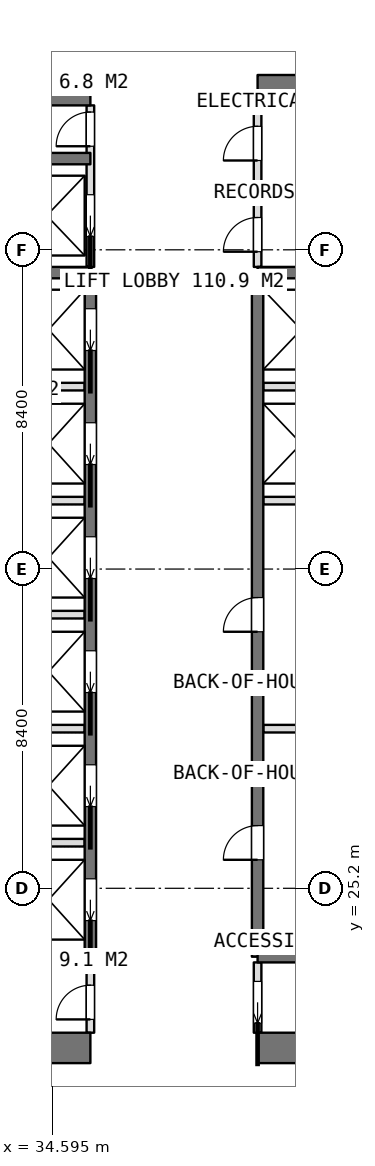
"""IFC4 building model, lengths in metres.
Left out: names, types, materials, properties, quantities, classifications, styles, units other than length and angle.
Written with IfcOpenShell. Run it as: python <this file> out.ifc"""

import sys

from ifc_helpers import new_model, si_unit, direction, frame, frame_2d, origin, place, context, subcontext, project, spatial, rectangle, extrude, element, fill, save


model = new_model("IFC4")
c1 = context("Model", 3, precision=1e-05, world=origin(), true_north=direction((0.0, 1.0)))
c2 = subcontext(c1, "Body", "Model", "MODEL_VIEW")
j1 = project(units=[si_unit("LENGTHUNIT", "METRE"), si_unit("PLANEANGLEUNIT", "RADIAN")], contexts=[c1])
p1 = place(None, origin())
s1 = spatial("IfcSite", under=j1, at=p1, CompositionType="ELEMENT")
p2 = place(p1, origin())
s2 = spatial("IfcBuilding", under=s1, at=p2, CompositionType="ELEMENT")
p3 = place(p2, frame((0.0, 0.0, 257.6)))
s3 = spatial("IfcBuildingStorey", under=s2, at=p3, CompositionType="ELEMENT", Elevation=257.6)
p4 = place(p3, frame((25.2, 21.0, 0.0), z_axis=(0.0, 0.0, 1.0), x_axis=(1.0, 0.0, 0.0)))
e1 = element("IfcWall", 1, at=p4, inside=s3, PredefinedType="SHEAR", context=c2, shape_type="SweptSolid", body=[
    extrude(rectangle(XDim=10.4, YDim=0.8, at=frame_2d((5.2, 0.0))), origin(), (0.0, 0.0, 1.0), 3.75),
])
p5 = place(p3, frame((40.0, 21.0, 0.0), z_axis=(0.0, 0.0, 1.0), x_axis=(1.0, 0.0, 0.0)))
e2 = element("IfcWall", 2, at=p5, inside=s3, PredefinedType="SHEAR", context=c2, shape_type="SweptSolid", body=[
    extrude(rectangle(XDim=10.4, YDim=0.8, at=frame_2d((5.2, 0.0))), origin(), (0.0, 0.0, 1.0), 3.75),
])
p6 = place(p3, frame((25.2, 46.2, 0.0), z_axis=(0.0, 0.0, 1.0), x_axis=(1.0, 0.0, 0.0)))
e3 = element("IfcWall", 3, at=p6, inside=s3, PredefinedType="SHEAR", context=c2, shape_type="SweptSolid", body=[
    extrude(rectangle(XDim=10.4, YDim=0.8, at=frame_2d((5.2, 0.0))), origin(), (0.0, 0.0, 1.0), 3.75),
])
p7 = place(p3, frame((40.0, 46.2, 0.0), z_axis=(0.0, 0.0, 1.0), x_axis=(1.0, 0.0, 0.0)))
e4 = element("IfcWall", 4, at=p7, inside=s3, PredefinedType="SHEAR", context=c2, shape_type="SweptSolid", body=[
    extrude(rectangle(XDim=10.4, YDim=0.8, at=frame_2d((5.2, 0.0))), origin(), (0.0, 0.0, 1.0), 3.75),
])
p8 = place(p3, frame((35.6, 23.4, 0.0), z_axis=(0.0, 0.0, 1.0), x_axis=(0.0, 1.0, 0.0)))
e5 = element("IfcWall", 5, at=p8, inside=s3, PredefinedType="SHEAR", context=c2, shape_type="SweptSolid", body=[
    extrude(rectangle(XDim=18.0, YDim=0.3, at=frame_2d((9.0, 0.0))), origin(), (0.0, 0.0, 1.0), 3.75),
])
p9 = place(p8, frame((0.95, 0.0, 0.0)))
e6 = element("IfcOpeningElement", 6, at=p9, cuts=e5, PredefinedType="OPENING", context=c2, shape_type="SweptSolid", body=[
    extrude(rectangle(XDim=1.1, YDim=2.1, at=frame_2d((0.55, 1.05))), frame((0.0, 0.16, 0.0), z_axis=(0.0, -1.0, 0.0), x_axis=(1.0, 0.0, 0.0)), (0.0, 0.0, 1.0), 0.32),
])
p10 = place(p8, frame((3.95, 0.0, 0.0)))
e7 = element("IfcOpeningElement", 7, at=p10, cuts=e5, PredefinedType="OPENING", context=c2, shape_type="SweptSolid", body=[
    extrude(rectangle(XDim=1.1, YDim=2.1, at=frame_2d((0.55, 1.05))), frame((0.0, 0.16, 0.0), z_axis=(0.0, -1.0, 0.0), x_axis=(1.0, 0.0, 0.0)), (0.0, 0.0, 1.0), 0.32),
])
p11 = place(p8, frame((6.95, 0.0, 0.0)))
e8 = element("IfcOpeningElement", 8, at=p11, cuts=e5, PredefinedType="OPENING", context=c2, shape_type="SweptSolid", body=[
    extrude(rectangle(XDim=1.1, YDim=2.1, at=frame_2d((0.55, 1.05))), frame((0.0, 0.16, 0.0), z_axis=(0.0, -1.0, 0.0), x_axis=(1.0, 0.0, 0.0)), (0.0, 0.0, 1.0), 0.32),
])
p12 = place(p8, frame((9.95, 0.0, 0.0)))
e9 = element("IfcOpeningElement", 9, at=p12, cuts=e5, PredefinedType="OPENING", context=c2, shape_type="SweptSolid", body=[
    extrude(rectangle(XDim=1.1, YDim=2.1, at=frame_2d((0.55, 1.05))), frame((0.0, 0.16, 0.0), z_axis=(0.0, -1.0, 0.0), x_axis=(1.0, 0.0, 0.0)), (0.0, 0.0, 1.0), 0.32),
])
p13 = place(p8, frame((12.95, 0.0, 0.0)))
e10 = element("IfcOpeningElement", 10, at=p13, cuts=e5, PredefinedType="OPENING", context=c2, shape_type="SweptSolid", body=[
    extrude(rectangle(XDim=1.1, YDim=2.1, at=frame_2d((0.55, 1.05))), frame((0.0, 0.16, 0.0), z_axis=(0.0, -1.0, 0.0), x_axis=(1.0, 0.0, 0.0)), (0.0, 0.0, 1.0), 0.32),
])
p14 = place(p8, frame((15.95, 0.0, 0.0)))
e11 = element("IfcOpeningElement", 11, at=p14, cuts=e5, PredefinedType="OPENING", context=c2, shape_type="SweptSolid", body=[
    extrude(rectangle(XDim=1.1, YDim=2.1, at=frame_2d((0.55, 1.05))), frame((0.0, 0.16, 0.0), z_axis=(0.0, -1.0, 0.0), x_axis=(1.0, 0.0, 0.0)), (0.0, 0.0, 1.0), 0.32),
])
p15 = place(p3, frame((40.0, 23.4, 0.0), z_axis=(0.0, 0.0, 1.0), x_axis=(0.0, 1.0, 0.0)))
e12 = element("IfcWall", 12, at=p15, inside=s3, PredefinedType="SHEAR", context=c2, shape_type="SweptSolid", body=[
    extrude(rectangle(XDim=18.0, YDim=0.3, at=frame_2d((9.0, 0.0))), origin(), (0.0, 0.0, 1.0), 3.75),
])
p16 = place(p15, frame((2.55, 0.0, 0.0)))
e13 = element("IfcOpeningElement", 13, at=p16, cuts=e12, PredefinedType="OPENING", context=c2, shape_type="SweptSolid", body=[
    extrude(rectangle(XDim=0.9, YDim=2.1, at=frame_2d((0.45, 1.05))), frame((0.0, 0.16, 0.0), z_axis=(0.0, -1.0, 0.0), x_axis=(1.0, 0.0, 0.0)), (0.0, 0.0, 1.0), 0.32),
])
p17 = place(p15, frame((8.55, 0.0, 0.0)))
e14 = element("IfcOpeningElement", 14, at=p17, cuts=e12, PredefinedType="OPENING", context=c2, shape_type="SweptSolid", body=[
    extrude(rectangle(XDim=0.9, YDim=2.1, at=frame_2d((0.45, 1.05))), frame((0.0, 0.16, 0.0), z_axis=(0.0, -1.0, 0.0), x_axis=(1.0, 0.0, 0.0)), (0.0, 0.0, 1.0), 0.32),
])
for number, where, z_axis, x_axis in (
    (15, (31.8, 23.4, 0.0), (0.0, 0.0, 1.0), (1.0, 0.0, 0.0)),
    (16, (31.8, 41.4, 0.0), (0.0, 0.0, 1.0), (1.0, 0.0, 0.0)),
    (17, (31.8, 44.4, 0.0), (0.0, 0.0, 1.0), (1.0, 0.0, 0.0)),
    (18, (40.0, 23.4, 0.0), (0.0, 0.0, 1.0), (1.0, 0.0, 0.0)),
    (19, (40.0, 41.4, 0.0), (0.0, 0.0, 1.0), (1.0, 0.0, 0.0)),
):
    element("IfcWall", number, at=place(p3, frame(where, z_axis=z_axis, x_axis=x_axis)), inside=s3, PredefinedType="SHEAR", context=c2, shape_type="SweptSolid", body=[
        extrude(rectangle(XDim=3.8, YDim=0.3, at=frame_2d((1.9, 0.0))), origin(), (0.0, 0.0, 1.0), 3.75),
    ])
for number, where, z_axis, x_axis in (
    (20, (31.95, 26.4, 0.0), (0.0, 0.0, 1.0), (1.0, 0.0, 0.0)),
    (21, (31.95, 29.4, 0.0), (0.0, 0.0, 1.0), (1.0, 0.0, 0.0)),
    (22, (31.95, 32.4, 0.0), (0.0, 0.0, 1.0), (1.0, 0.0, 0.0)),
    (23, (31.95, 35.4, 0.0), (0.0, 0.0, 1.0), (1.0, 0.0, 0.0)),
    (24, (31.95, 38.4, 0.0), (0.0, 0.0, 1.0), (1.0, 0.0, 0.0)),
    (25, (40.15, 29.4, 0.0), (0.0, 0.0, 1.0), (1.0, 0.0, 0.0)),
    (26, (40.15, 35.4, 0.0), (0.0, 0.0, 1.0), (1.0, 0.0, 0.0)),
    (27, (40.15, 38.4, 0.0), (0.0, 0.0, 1.0), (1.0, 0.0, 0.0)),
):
    element("IfcWall", number, at=place(p3, frame(where, z_axis=z_axis, x_axis=x_axis)), inside=s3, PredefinedType="PARTITIONING", context=c2, shape_type="SweptSolid", body=[
        extrude(rectangle(XDim=3.5, YDim=0.2, at=frame_2d((1.75, 0.0))), origin(), (0.0, 0.0, 1.0), 3.5),
    ])
p18 = place(p3, frame((40.0, 21.4, 0.0), z_axis=(0.0, 0.0, 1.0), x_axis=(0.0, 1.0, 0.0)))
e28 = element("IfcWall", 28, at=p18, inside=s3, PredefinedType="PARTITIONING", context=c2, shape_type="SweptSolid", body=[
    extrude(rectangle(XDim=1.85, YDim=0.2, at=frame_2d((0.925, 0.0))), origin(), (0.0, 0.0, 1.0), 3.5),
])
p19 = place(p18, frame((0.25, 0.0, 0.0)))
e29 = element("IfcOpeningElement", 29, at=p19, cuts=e28, PredefinedType="OPENING", context=c2, shape_type="SweptSolid", body=[
    extrude(rectangle(XDim=1.1, YDim=2.1, at=frame_2d((0.55, 1.05))), frame((0.0, 0.11, 0.0), z_axis=(0.0, -1.0, 0.0), x_axis=(1.0, 0.0, 0.0)), (0.0, 0.0, 1.0), 0.22),
])
p20 = place(p3, frame((40.0, 41.55, 0.0), z_axis=(0.0, 0.0, 1.0), x_axis=(0.0, 1.0, 0.0)))
e30 = element("IfcWall", 30, at=p20, inside=s3, PredefinedType="PARTITIONING", context=c2, shape_type="SweptSolid", body=[
    extrude(rectangle(XDim=4.25, YDim=0.2, at=frame_2d((2.125, 0.0))), origin(), (0.0, 0.0, 1.0), 3.5),
])
p21 = place(p20, frame((2.8, 0.0, 0.0)))
e31 = element("IfcOpeningElement", 31, at=p21, cuts=e30, PredefinedType="OPENING", context=c2, shape_type="SweptSolid", body=[
    extrude(rectangle(XDim=0.9, YDim=2.1, at=frame_2d((0.45, 1.05))), frame((0.0, 0.11, 0.0), z_axis=(0.0, -1.0, 0.0), x_axis=(1.0, 0.0, 0.0)), (0.0, 0.0, 1.0), 0.22),
])
p22 = place(p20, frame((0.4, 0.0, 0.0)))
e32 = element("IfcOpeningElement", 32, at=p22, cuts=e30, PredefinedType="OPENING", context=c2, shape_type="SweptSolid", body=[
    extrude(rectangle(XDim=0.9, YDim=2.1, at=frame_2d((0.45, 1.05))), frame((0.0, 0.11, 0.0), z_axis=(0.0, -1.0, 0.0), x_axis=(1.0, 0.0, 0.0)), (0.0, 0.0, 1.0), 0.22),
])
p23 = place(p3, frame((35.6, 41.55, 0.0), z_axis=(0.0, 0.0, 1.0), x_axis=(0.0, 1.0, 0.0)))
e33 = element("IfcWall", 33, at=p23, inside=s3, PredefinedType="PARTITIONING", context=c2, shape_type="SweptSolid", body=[
    extrude(rectangle(XDim=4.25, YDim=0.2, at=frame_2d((2.125, 0.0))), origin(), (0.0, 0.0, 1.0), 3.5),
])
p24 = place(p23, frame((3.175, 0.0, 0.0)))
e34 = element("IfcOpeningElement", 34, at=p24, cuts=e33, PredefinedType="OPENING", context=c2, shape_type="SweptSolid", body=[
    extrude(rectangle(XDim=0.9, YDim=2.1, at=frame_2d((0.45, 1.05))), frame((0.0, 0.11, 0.0), z_axis=(0.0, -1.0, 0.0), x_axis=(1.0, 0.0, 0.0)), (0.0, 0.0, 1.0), 0.22),
])
p25 = place(p23, frame((0.8, 0.0, 0.0)))
e35 = element("IfcOpeningElement", 35, at=p25, cuts=e33, PredefinedType="OPENING", context=c2, shape_type="SweptSolid", body=[
    extrude(rectangle(XDim=1.1, YDim=2.1, at=frame_2d((0.55, 1.05))), frame((0.0, 0.11, 0.0), z_axis=(0.0, -1.0, 0.0), x_axis=(1.0, 0.0, 0.0)), (0.0, 0.0, 1.0), 0.22),
])
p26 = place(p3, frame((35.6, 21.4, 0.0), z_axis=(0.0, 0.0, 1.0), x_axis=(0.0, 1.0, 0.0)))
e36 = element("IfcWall", 36, at=p26, inside=s3, PredefinedType="PARTITIONING", context=c2, shape_type="SweptSolid", body=[
    extrude(rectangle(XDim=1.85, YDim=0.2, at=frame_2d((0.925, 0.0))), origin(), (0.0, 0.0, 1.0), 3.5),
])
p27 = place(p26, frame((0.35, 0.0, 0.0)))
e37 = element("IfcOpeningElement", 37, at=p27, cuts=e36, PredefinedType="OPENING", context=c2, shape_type="SweptSolid", body=[
    extrude(rectangle(XDim=0.9, YDim=2.1, at=frame_2d((0.45, 1.05))), frame((0.0, 0.11, 0.0), z_axis=(0.0, -1.0, 0.0), x_axis=(1.0, 0.0, 0.0)), (0.0, 0.0, 1.0), 0.22),
])
p28 = place(p3, frame((40.0, 43.4, 0.0), z_axis=(0.0, 0.0, 1.0), x_axis=(1.0, 0.0, 0.0)))
e38 = element("IfcWall", 38, at=p28, inside=s3, PredefinedType="PARTITIONING", context=c2, shape_type="SweptSolid", body=[
    extrude(rectangle(XDim=3.65, YDim=0.2, at=frame_2d((1.825, 0.0))), origin(), (0.0, 0.0, 1.0), 3.5),
])
p29 = place(p19, origin())
e39 = element("IfcDoor", 39, at=p29, inside=s3, OperationType="SLIDING_TO_LEFT", PredefinedType="DOOR", context=c2, shape_type="SweptSolid", body=[
    extrude(rectangle(XDim=1.1, YDim=2.1, at=frame_2d((0.55, 1.05))), frame((0.0, 0.025, 0.0), z_axis=(0.0, -1.0, 0.0), x_axis=(1.0, 0.0, 0.0)), (0.0, 0.0, 1.0), 0.05),
])
fill(e29, e39)
p30 = place(p27, origin())
e40 = element("IfcDoor", 40, at=p30, inside=s3, OperationType="SINGLE_SWING_LEFT", PredefinedType="DOOR", context=c2, shape_type="SweptSolid", body=[
    extrude(rectangle(XDim=0.9, YDim=2.1, at=frame_2d((0.45, 1.05))), frame((0.0, 0.025, 0.0), z_axis=(0.0, -1.0, 0.0), x_axis=(1.0, 0.0, 0.0)), (0.0, 0.0, 1.0), 0.05),
])
fill(e37, e40)
p31 = place(p21, origin())
e41 = element("IfcDoor", 41, at=p31, inside=s3, OperationType="SINGLE_SWING_LEFT", PredefinedType="DOOR", context=c2, shape_type="SweptSolid", body=[
    extrude(rectangle(XDim=0.9, YDim=2.1, at=frame_2d((0.45, 1.05))), frame((0.0, 0.025, 0.0), z_axis=(0.0, -1.0, 0.0), x_axis=(1.0, 0.0, 0.0)), (0.0, 0.0, 1.0), 0.05),
])
fill(e31, e41)
p32 = place(p22, origin())
e42 = element("IfcDoor", 42, at=p32, inside=s3, OperationType="SINGLE_SWING_LEFT", PredefinedType="DOOR", context=c2, shape_type="SweptSolid", body=[
    extrude(rectangle(XDim=0.9, YDim=2.1, at=frame_2d((0.45, 1.05))), frame((0.0, 0.025, 0.0), z_axis=(0.0, -1.0, 0.0), x_axis=(1.0, 0.0, 0.0)), (0.0, 0.0, 1.0), 0.05),
])
fill(e32, e42)
p33 = place(p16, origin())
e43 = element("IfcDoor", 43, at=p33, inside=s3, OperationType="SINGLE_SWING_LEFT", PredefinedType="DOOR", context=c2, shape_type="SweptSolid", body=[
    extrude(rectangle(XDim=0.9, YDim=2.1, at=frame_2d((0.45, 1.05))), frame((0.0, 0.025, 0.0), z_axis=(0.0, -1.0, 0.0), x_axis=(1.0, 0.0, 0.0)), (0.0, 0.0, 1.0), 0.05),
])
fill(e13, e43)
p34 = place(p17, origin())
e44 = element("IfcDoor", 44, at=p34, inside=s3, OperationType="SINGLE_SWING_LEFT", PredefinedType="DOOR", context=c2, shape_type="SweptSolid", body=[
    extrude(rectangle(XDim=0.9, YDim=2.1, at=frame_2d((0.45, 1.05))), frame((0.0, 0.025, 0.0), z_axis=(0.0, -1.0, 0.0), x_axis=(1.0, 0.0, 0.0)), (0.0, 0.0, 1.0), 0.05),
])
fill(e14, e44)
p35 = place(p24, origin())
e45 = element("IfcDoor", 45, at=p35, inside=s3, OperationType="SINGLE_SWING_LEFT", PredefinedType="DOOR", context=c2, shape_type="SweptSolid", body=[
    extrude(rectangle(XDim=0.9, YDim=2.1, at=frame_2d((0.45, 1.05))), frame((0.0, 0.025, 0.0), z_axis=(0.0, -1.0, 0.0), x_axis=(1.0, 0.0, 0.0)), (0.0, 0.0, 1.0), 0.05),
])
fill(e34, e45)
p36 = place(p9, origin())
e46 = element("IfcDoor", 46, at=p36, inside=s3, OperationType="SLIDING_TO_LEFT", PredefinedType="USERDEFINED", context=c2, shape_type="SweptSolid", body=[
    extrude(rectangle(XDim=1.1, YDim=2.1, at=frame_2d((0.55, 1.05))), frame((0.0, 0.025, 0.0), z_axis=(0.0, -1.0, 0.0), x_axis=(1.0, 0.0, 0.0)), (0.0, 0.0, 1.0), 0.05),
])
fill(e6, e46)
p37 = place(p10, origin())
e47 = element("IfcDoor", 47, at=p37, inside=s3, OperationType="SLIDING_TO_LEFT", PredefinedType="USERDEFINED", context=c2, shape_type="SweptSolid", body=[
    extrude(rectangle(XDim=1.1, YDim=2.1, at=frame_2d((0.55, 1.05))), frame((0.0, 0.025, 0.0), z_axis=(0.0, -1.0, 0.0), x_axis=(1.0, 0.0, 0.0)), (0.0, 0.0, 1.0), 0.05),
])
fill(e7, e47)
p38 = place(p11, origin())
e48 = element("IfcDoor", 48, at=p38, inside=s3, OperationType="SLIDING_TO_LEFT", PredefinedType="USERDEFINED", context=c2, shape_type="SweptSolid", body=[
    extrude(rectangle(XDim=1.1, YDim=2.1, at=frame_2d((0.55, 1.05))), frame((0.0, 0.025, 0.0), z_axis=(0.0, -1.0, 0.0), x_axis=(1.0, 0.0, 0.0)), (0.0, 0.0, 1.0), 0.05),
])
fill(e8, e48)
p39 = place(p12, origin())
e49 = element("IfcDoor", 49, at=p39, inside=s3, OperationType="SLIDING_TO_LEFT", PredefinedType="USERDEFINED", context=c2, shape_type="SweptSolid", body=[
    extrude(rectangle(XDim=1.1, YDim=2.1, at=frame_2d((0.55, 1.05))), frame((0.0, 0.025, 0.0), z_axis=(0.0, -1.0, 0.0), x_axis=(1.0, 0.0, 0.0)), (0.0, 0.0, 1.0), 0.05),
])
fill(e9, e49)
p40 = place(p13, origin())
e50 = element("IfcDoor", 50, at=p40, inside=s3, OperationType="SLIDING_TO_LEFT", PredefinedType="USERDEFINED", context=c2, shape_type="SweptSolid", body=[
    extrude(rectangle(XDim=1.1, YDim=2.1, at=frame_2d((0.55, 1.05))), frame((0.0, 0.025, 0.0), z_axis=(0.0, -1.0, 0.0), x_axis=(1.0, 0.0, 0.0)), (0.0, 0.0, 1.0), 0.05),
])
fill(e10, e50)
p41 = place(p14, origin())
e51 = element("IfcDoor", 51, at=p41, inside=s3, OperationType="SLIDING_TO_LEFT", PredefinedType="USERDEFINED", context=c2, shape_type="SweptSolid", body=[
    extrude(rectangle(XDim=1.1, YDim=2.1, at=frame_2d((0.55, 1.05))), frame((0.0, 0.025, 0.0), z_axis=(0.0, -1.0, 0.0), x_axis=(1.0, 0.0, 0.0)), (0.0, 0.0, 1.0), 0.05),
])
fill(e11, e51)
p42 = place(p25, origin())
e52 = element("IfcDoor", 52, at=p42, inside=s3, OperationType="SLIDING_TO_LEFT", PredefinedType="USERDEFINED", context=c2, shape_type="SweptSolid", body=[
    extrude(rectangle(XDim=1.1, YDim=2.1, at=frame_2d((0.55, 1.05))), frame((0.0, 0.025, 0.0), z_axis=(0.0, -1.0, 0.0), x_axis=(1.0, 0.0, 0.0)), (0.0, 0.0, 1.0), 0.05),
])
fill(e35, e52)
save(model, sys.argv[1])
